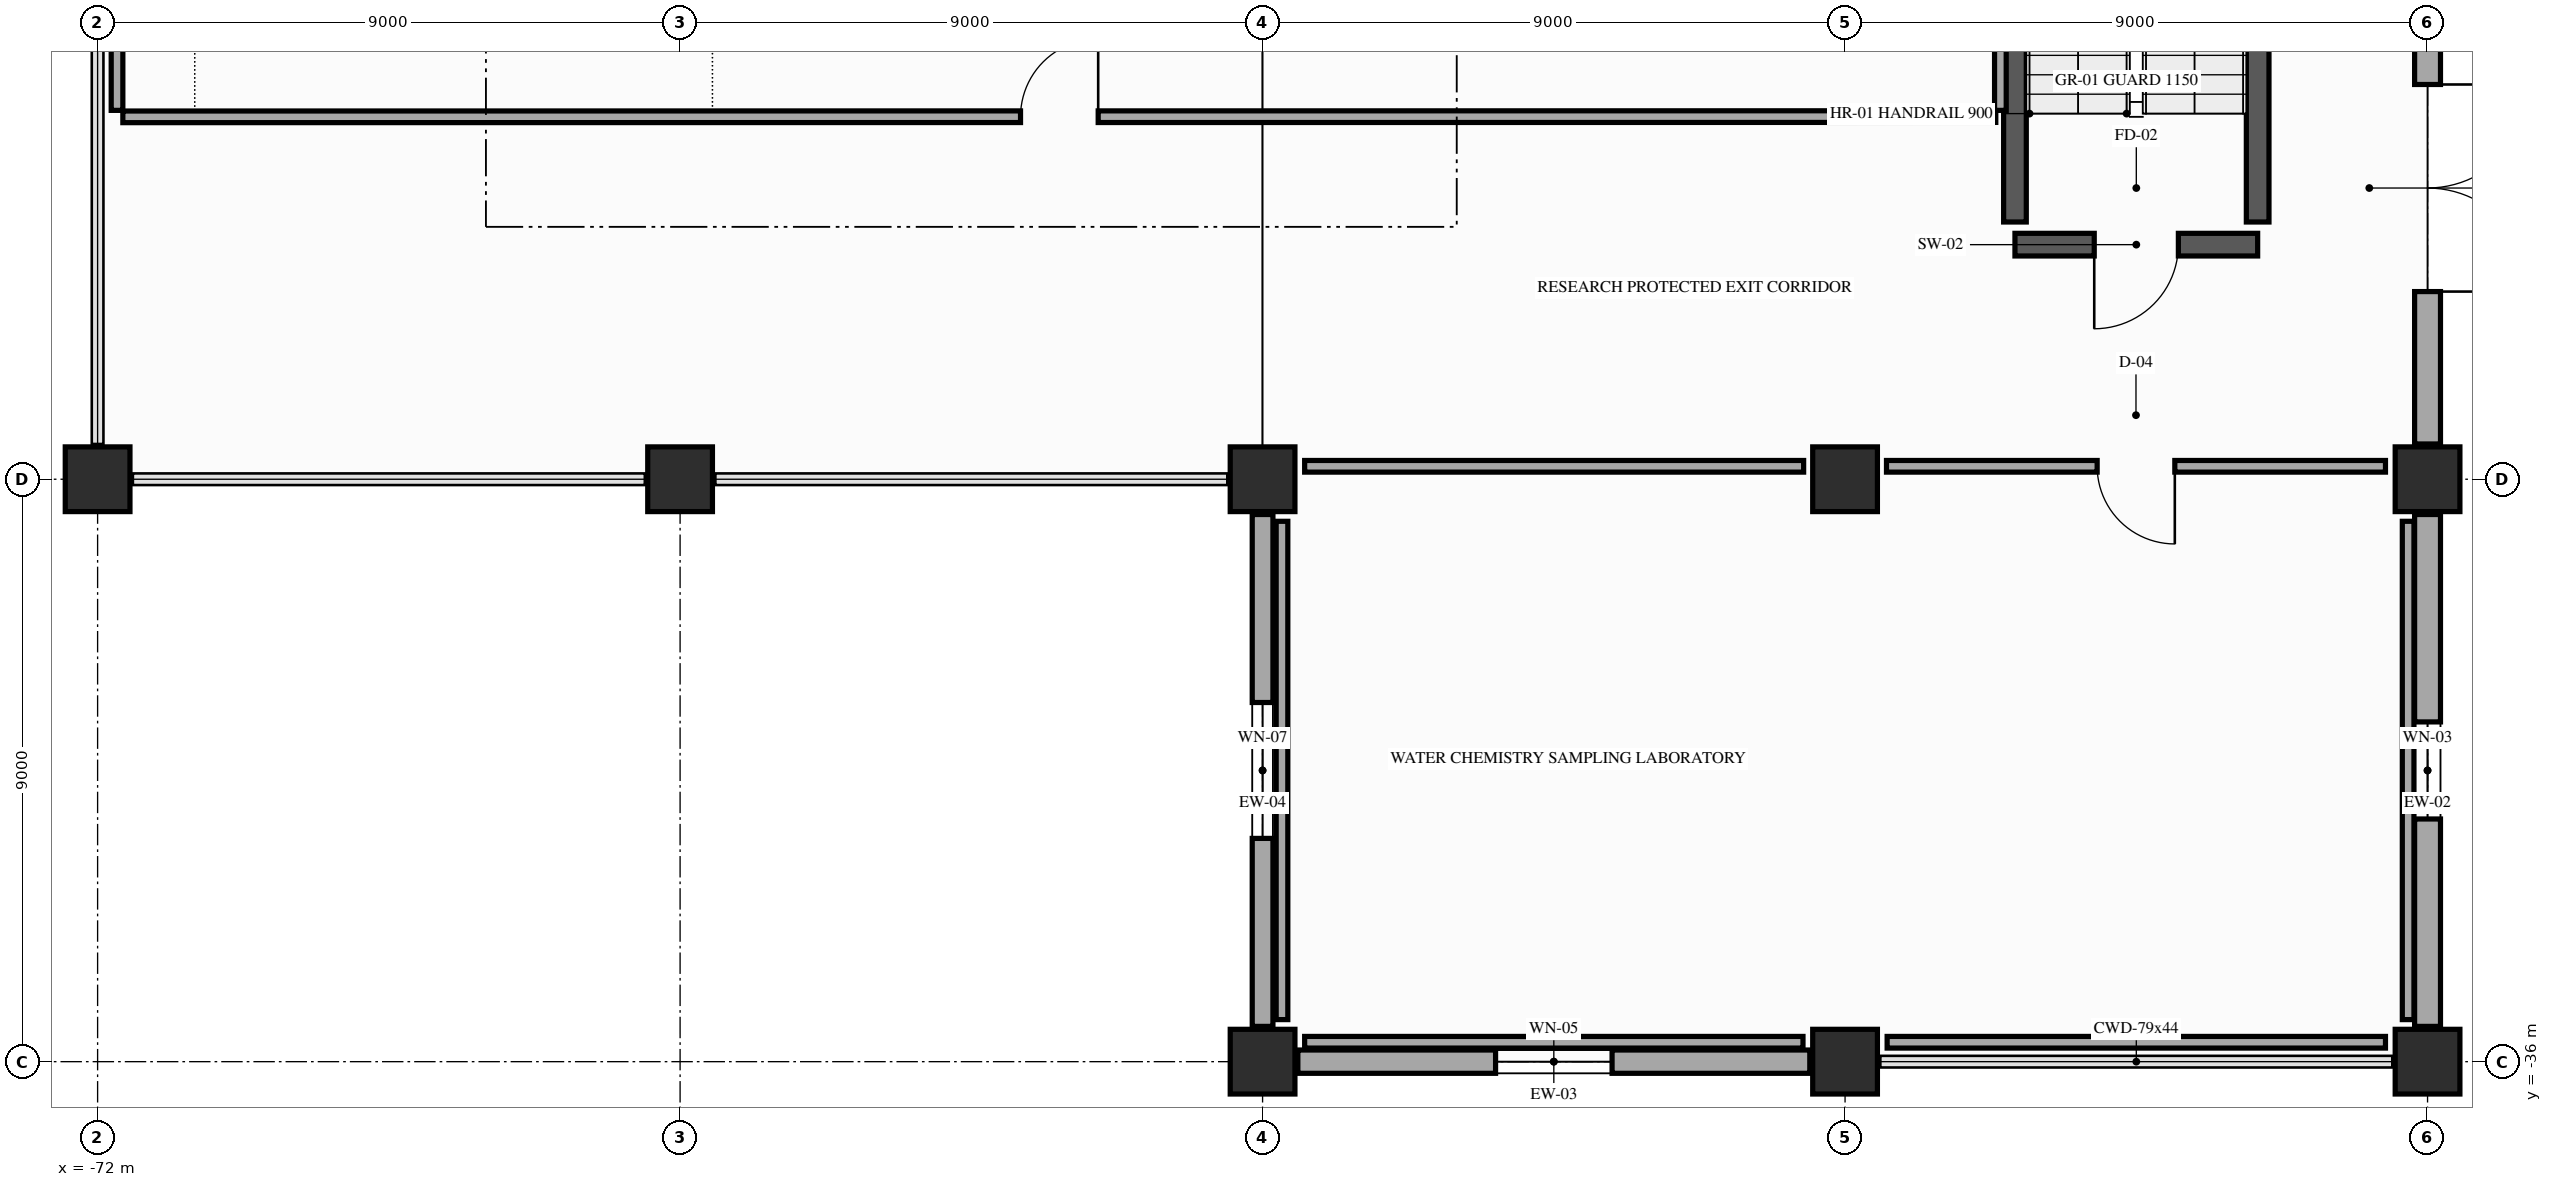
"""IFC4 building model, lengths in metres.
Left out: names, types, materials, properties, quantities, classifications, styles, units other than length and angle.
Written with IfcOpenShell. Run it as: python <this file> out.ifc"""

import sys

from ifc_helpers import new_model, si_unit, direction, frame, frame_2d, origin, origin_2d, place, context, subcontext, project, spatial, rectangle, extrude, element, fill, save


model = new_model("IFC4")
c1 = context("Model", 3, precision=1e-05, world=origin(), true_north=direction((0.0, 1.0)))
c2 = subcontext(c1, "Body", "Model", "MODEL_VIEW")
j1 = project(units=[si_unit("LENGTHUNIT", "METRE"), si_unit("PLANEANGLEUNIT", "RADIAN")], contexts=[c1])
p1 = place(None, origin())
s1 = spatial("IfcSite", under=j1, at=p1, CompositionType="ELEMENT")
p2 = place(p1, origin())
s2 = spatial("IfcBuilding", under=s1, at=p2, CompositionType="ELEMENT")
p3 = place(p2, origin())
s3 = spatial("IfcBuildingStorey", under=s2, at=p3, CompositionType="ELEMENT", Elevation=0.0)
for number, where, z_axis, x_axis in (
    (1, (-72.0, -27.0, 0.0), (0.0, 0.0, 1.0), (1.0, 0.0, 0.0)),
    (2, (-63.0, -27.0, 0.0), (0.0, 0.0, 1.0), (1.0, 0.0, 0.0)),
    (3, (-54.0, -36.0, 0.0), (0.0, 0.0, 1.0), (1.0, 0.0, 0.0)),
    (4, (-54.0, -27.0, 0.0), (0.0, 0.0, 1.0), (1.0, 0.0, 0.0)),
    (5, (-45.0, -36.0, 0.0), (0.0, 0.0, 1.0), (1.0, 0.0, 0.0)),
    (6, (-45.0, -27.0, 0.0), (0.0, 0.0, 1.0), (1.0, 0.0, 0.0)),
    (7, (-36.0, -36.0, 0.0), (0.0, 0.0, 1.0), (1.0, 0.0, 0.0)),
    (8, (-36.0, -27.0, 0.0), (0.0, 0.0, 1.0), (1.0, 0.0, 0.0)),
):
    element("IfcColumn", number, at=place(p3, frame(where, z_axis=z_axis, x_axis=x_axis)), inside=s3, PredefinedType="COLUMN", context=c2, shape_type="SweptSolid", body=[
        extrude(rectangle(XDim=1.0, YDim=1.0, at=origin_2d()), origin(), (0.0, 0.0, 1.0), 5.4),
    ])
p4 = place(p3, frame((-36.0, -18.545, 0.0), z_axis=(0.0, 0.0, 1.0), x_axis=(0.0, -1.0, 0.0)))
e9 = element("IfcWall", 9, at=p4, inside=s3, PredefinedType="SOLIDWALL", context=c2, shape_type="SweptSolid", body=[
    extrude(rectangle(XDim=7.91, YDim=0.4, at=frame_2d((3.955, 0.0))), origin(), (0.0, 0.0, 1.0), 4.405),
])
p5 = place(p4, frame((2.355, 0.0, 0.0)))
e10 = element("IfcOpeningElement", 10, at=p5, cuts=e9, PredefinedType="OPENING", context=c2, shape_type="SweptSolid", body=[
    extrude(rectangle(XDim=3.2, YDim=3.0, at=frame_2d((1.6, 1.5))), frame((0.0, 0.21, 0.0), z_axis=(0.0, -1.0, 0.0), x_axis=(1.0, 0.0, 0.0)), (0.0, 0.0, 1.0), 0.42),
])
p6 = place(p3, frame((-36.0, -27.545, 0.0), z_axis=(0.0, 0.0, 1.0), x_axis=(0.0, -1.0, 0.0)))
e11 = element("IfcWall", 11, at=p6, inside=s3, PredefinedType="SOLIDWALL", context=c2, shape_type="SweptSolid", body=[
    extrude(rectangle(XDim=7.91, YDim=0.4, at=frame_2d((3.955, 0.0))), origin(), (0.0, 0.0, 1.0), 4.405),
])
p7 = place(p6, frame((3.205, 0.0, 0.9)))
e12 = element("IfcOpeningElement", 12, at=p7, cuts=e11, PredefinedType="OPENING", context=c2, shape_type="SweptSolid", body=[
    extrude(rectangle(XDim=1.5, YDim=2.8, at=frame_2d((0.75, 1.4))), frame((0.0, 0.21, 0.0), z_axis=(0.0, -1.0, 0.0), x_axis=(1.0, 0.0, 0.0)), (0.0, 0.0, 1.0), 0.42),
])
p8 = place(p3, frame((-45.545, -36.0, 0.0), z_axis=(0.0, 0.0, 1.0), x_axis=(-1.0, 0.0, 0.0)))
e13 = element("IfcWall", 13, at=p8, inside=s3, PredefinedType="SOLIDWALL", context=c2, shape_type="SweptSolid", body=[
    extrude(rectangle(XDim=7.91, YDim=0.36, at=frame_2d((3.955, 0.0))), origin(), (0.0, 0.0, 1.0), 4.405),
])
p9 = place(p8, frame((3.055, 0.0, 0.9)))
e14 = element("IfcOpeningElement", 14, at=p9, cuts=e13, PredefinedType="OPENING", context=c2, shape_type="SweptSolid", body=[
    extrude(rectangle(XDim=1.8, YDim=2.6, at=frame_2d((0.9, 1.3))), frame((0.0, 0.19, 0.0), z_axis=(0.0, -1.0, 0.0), x_axis=(1.0, 0.0, 0.0)), (0.0, 0.0, 1.0), 0.38),
])
p10 = place(p3, frame((-54.0, -35.455, 0.0), z_axis=(0.0, 0.0, 1.0), x_axis=(0.0, 1.0, 0.0)))
e15 = element("IfcWall", 15, at=p10, inside=s3, PredefinedType="SOLIDWALL", context=c2, shape_type="SweptSolid", body=[
    extrude(rectangle(XDim=7.91, YDim=0.32, at=frame_2d((3.955, 0.0))), origin(), (0.0, 0.0, 1.0), 4.405),
])
p11 = place(p10, frame((2.905, 0.0, 0.9)))
e16 = element("IfcOpeningElement", 16, at=p11, cuts=e15, PredefinedType="OPENING", context=c2, shape_type="SweptSolid", body=[
    extrude(rectangle(XDim=2.1, YDim=2.6, at=frame_2d((1.05, 1.3))), frame((0.0, 0.17, 0.0), z_axis=(0.0, -1.0, 0.0), x_axis=(1.0, 0.0, 0.0)), (0.0, 0.0, 1.0), 0.34),
])
p12 = place(p3, frame((-38.625, -23.375, 0.0), z_axis=(0.0, 0.0, 1.0), x_axis=(-1.0, 0.0, 0.0)))
e17 = element("IfcWall", 17, at=p12, inside=s3, PredefinedType="SHEAR", context=c2, shape_type="SweptSolid", body=[
    extrude(rectangle(XDim=3.75, YDim=0.35, at=frame_2d((1.875, 0.0))), origin(), (0.0, 0.0, 1.0), 5.12),
])
p13 = place(p12, frame((1.225, 0.0, 0.0)))
e18 = element("IfcOpeningElement", 18, at=p13, cuts=e17, PredefinedType="OPENING", context=c2, shape_type="SweptSolid", body=[
    extrude(rectangle(XDim=1.3, YDim=2.2, at=frame_2d((0.65, 1.1))), frame((0.0, 0.185, 0.0), z_axis=(0.0, -1.0, 0.0), x_axis=(1.0, 0.0, 0.0)), (0.0, 0.0, 1.0), 0.37),
])
for number, where, z_axis, x_axis in (
    (19, (-42.375, -23.025, 0.0), (0.0, 0.0, 1.0), (0.0, 1.0, 0.0)),
    (20, (-38.625, -23.025, 0.0), (0.0, 0.0, 1.0), (0.0, 1.0, 0.0)),
):
    element("IfcWall", number, at=place(p3, frame(where, z_axis=z_axis, x_axis=x_axis)), inside=s3, PredefinedType="SHEAR", context=c2, shape_type="SweptSolid", body=[
        extrude(rectangle(XDim=9.1, YDim=0.35, at=frame_2d((4.55, 0.0))), origin(), (0.0, 0.0, 1.0), 5.12),
    ])
p14 = place(p3, frame((-71.7, -18.64, 0.0), z_axis=(0.0, 0.0, 1.0), x_axis=(0.0, -1.0, 0.0)))
e21 = element("IfcWall", 21, at=p14, inside=s3, PredefinedType="PARTITIONING", context=c2, shape_type="SweptSolid", body=[
    extrude(rectangle(XDim=2.66, YDim=0.18, at=frame_2d((1.33, 0.0))), origin(), (0.0, 0.0, 1.0), 4.405),
])
p15 = place(p3, frame((-71.61, -21.4, 0.0), z_axis=(0.0, 0.0, 1.0), x_axis=(0.99999999089, 0.000134981228, 0.0)))
e22 = element("IfcWall", 22, at=p15, inside=s3, PredefinedType="PARTITIONING", context=c2, shape_type="SweptSolid", body=[
    extrude(rectangle(XDim=28.939, YDim=0.18, at=frame_2d((14.47, 0.0))), origin(), (0.0, 0.0, 1.0), 4.405),
])
p16 = place(p15, frame((13.87, 0.0, 0.0)))
e23 = element("IfcOpeningElement", 23, at=p16, cuts=e22, PredefinedType="OPENING", context=c2, shape_type="SweptSolid", body=[
    extrude(rectangle(XDim=1.2, YDim=2.2, at=frame_2d((0.6, 1.1))), frame((0.0, 0.1, 0.0), z_axis=(0.0, -1.0, 0.0), x_axis=(1.0, 0.0, 0.0)), (0.0, 0.0, 1.0), 0.2),
])
p17 = place(p3, frame((-42.6, -21.3, 0.0), z_axis=(0.0, 0.0, 1.0), x_axis=(-0.00032745951, 0.999999946385, 0.0)))
e24 = element("IfcWall", 24, at=p17, inside=s3, PredefinedType="PARTITIONING", context=c2, shape_type="SweptSolid", body=[
    extrude(rectangle(XDim=11.929, YDim=0.18, at=frame_2d((5.964, 0.0))), origin(), (0.0, 0.0, 1.0), 4.405),
])
for number, where, z_axis, x_axis in (
    (25, (-53.35, -35.7, 0.0), (0.0, 0.0, 1.0), (1.0, 0.0, 0.0)),
    (26, (-44.35, -35.7, 0.0), (0.0, 0.0, 1.0), (1.0, 0.0, 0.0)),
    (27, (-36.3, -35.35, 0.0), (0.0, 0.0, 1.0), (0.0, 1.0, 0.0)),
):
    element("IfcWall", number, at=place(p3, frame(where, z_axis=z_axis, x_axis=x_axis)), inside=s3, PredefinedType="PARTITIONING", context=c2, shape_type="SweptSolid", body=[
        extrude(rectangle(XDim=7.7, YDim=0.18, at=frame_2d((3.85, 0.0))), origin(), (0.0, 0.0, 1.0), 4.405),
    ])
p18 = place(p3, frame((-36.65, -26.8, 0.0), z_axis=(0.0, 0.0, 1.0), x_axis=(-1.0, 0.0, 0.0)))
e28 = element("IfcWall", 28, at=p18, inside=s3, PredefinedType="PARTITIONING", context=c2, shape_type="SweptSolid", body=[
    extrude(rectangle(XDim=7.71, YDim=0.18, at=frame_2d((3.855, 0.0))), origin(), (0.0, 0.0, 1.0), 4.405),
])
p19 = place(p18, frame((3.255, 0.0, 0.0)))
e29 = element("IfcOpeningElement", 29, at=p19, cuts=e28, PredefinedType="OPENING", context=c2, shape_type="SweptSolid", body=[
    extrude(rectangle(XDim=1.2, YDim=2.2, at=frame_2d((0.6, 1.1))), frame((0.0, 0.1, 0.0), z_axis=(0.0, -1.0, 0.0), x_axis=(1.0, 0.0, 0.0)), (0.0, 0.0, 1.0), 0.2),
])
p20 = place(p3, frame((-45.64, -26.8, 0.0), z_axis=(0.0, 0.0, 1.0), x_axis=(-1.0, 0.0, 0.0)))
e30 = element("IfcWall", 30, at=p20, inside=s3, PredefinedType="PARTITIONING", context=c2, shape_type="SweptSolid", body=[
    extrude(rectangle(XDim=7.71, YDim=0.18, at=frame_2d((3.855, 0.0))), origin(), (0.0, 0.0, 1.0), 4.405),
])
p21 = place(p3, frame((-53.7, -27.65, 0.0), z_axis=(0.0, 0.0, 1.0), x_axis=(0.0, -1.0, 0.0)))
e31 = element("IfcWall", 31, at=p21, inside=s3, PredefinedType="PARTITIONING", context=c2, shape_type="SweptSolid", body=[
    extrude(rectangle(XDim=7.7, YDim=0.18, at=frame_2d((3.85, 0.0))), origin(), (0.0, 0.0, 1.0), 4.405),
])
p22 = place(p5, origin())
e32 = element("IfcDoor", 32, at=p22, inside=s3, OperationType="DOUBLE_DOOR_SINGLE_SWING", PredefinedType="DOOR", context=c2, shape_type="SweptSolid", body=[
    extrude(rectangle(XDim=3.2, YDim=3.0, at=frame_2d((1.6, 1.5))), frame((0.0, 0.025, 0.0), z_axis=(0.0, -1.0, 0.0), x_axis=(1.0, 0.0, 0.0)), (0.0, 0.0, 1.0), 0.05),
])
fill(e10, e32)
p23 = place(p7, origin())
e33 = element("IfcWindow", 33, at=p23, inside=s3, PartitioningType="SINGLE_PANEL", PredefinedType="WINDOW", context=c2, shape_type="SweptSolid", body=[
    extrude(rectangle(XDim=1.5, YDim=2.8, at=frame_2d((0.75, 1.4))), frame((0.0, 0.03, 0.0), z_axis=(0.0, -1.0, 0.0), x_axis=(1.0, 0.0, 0.0)), (0.0, 0.0, 1.0), 0.06),
])
fill(e12, e33)
p24 = place(p9, origin())
e34 = element("IfcWindow", 34, at=p24, inside=s3, PartitioningType="SINGLE_PANEL", PredefinedType="WINDOW", context=c2, shape_type="SweptSolid", body=[
    extrude(rectangle(XDim=1.8, YDim=2.6, at=frame_2d((0.9, 1.3))), frame((0.0, 0.03, 0.0), z_axis=(0.0, -1.0, 0.0), x_axis=(1.0, 0.0, 0.0)), (0.0, 0.0, 1.0), 0.06),
])
fill(e14, e34)
p25 = place(p11, origin())
e35 = element("IfcWindow", 35, at=p25, inside=s3, PartitioningType="SINGLE_PANEL", PredefinedType="WINDOW", context=c2, shape_type="SweptSolid", body=[
    extrude(rectangle(XDim=2.1, YDim=2.6, at=frame_2d((1.05, 1.3))), frame((0.0, 0.03, 0.0), z_axis=(0.0, -1.0, 0.0), x_axis=(1.0, 0.0, 0.0)), (0.0, 0.0, 1.0), 0.06),
])
fill(e16, e35)
p26 = place(p13, origin())
e36 = element("IfcDoor", 36, at=p26, inside=s3, OperationType="SINGLE_SWING_RIGHT", PredefinedType="DOOR", context=c2, shape_type="SweptSolid", body=[
    extrude(rectangle(XDim=1.3, YDim=2.2, at=frame_2d((0.65, 1.1))), frame((0.0, 0.025, 0.0), z_axis=(0.0, -1.0, 0.0), x_axis=(1.0, 0.0, 0.0)), (0.0, 0.0, 1.0), 0.05),
])
fill(e18, e36)
p27 = place(p16, origin())
e37 = element("IfcDoor", 37, at=p27, inside=s3, OperationType="SINGLE_SWING_RIGHT", PredefinedType="DOOR", context=c2, shape_type="SweptSolid", body=[
    extrude(rectangle(XDim=1.2, YDim=2.2, at=frame_2d((0.6, 1.1))), frame((0.0, 0.025, 0.0), z_axis=(0.0, -1.0, 0.0), x_axis=(1.0, 0.0, 0.0)), (0.0, 0.0, 1.0), 0.05),
])
fill(e23, e37)
p28 = place(p19, origin())
e38 = element("IfcDoor", 38, at=p28, inside=s3, OperationType="SINGLE_SWING_LEFT", PredefinedType="DOOR", context=c2, shape_type="SweptSolid", body=[
    extrude(rectangle(XDim=1.2, YDim=2.2, at=frame_2d((0.6, 1.1))), frame((0.0, 0.025, 0.0), z_axis=(0.0, -1.0, 0.0), x_axis=(1.0, 0.0, 0.0)), (0.0, 0.0, 1.0), 0.05),
])
fill(e29, e38)
save(model, sys.argv[1])
